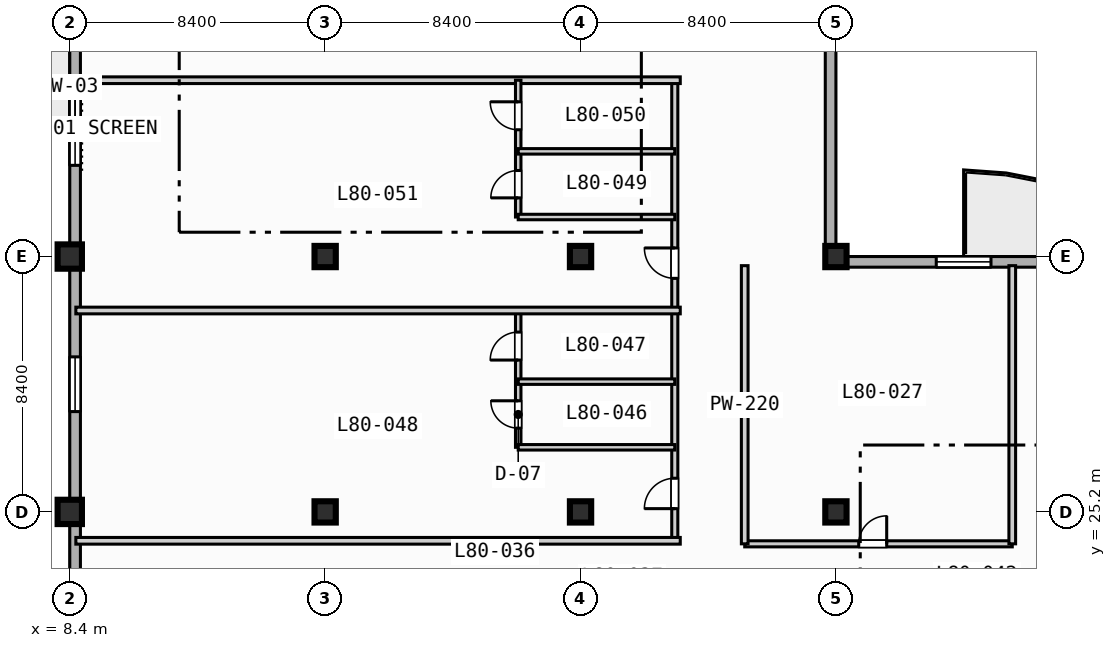
"""IFC4 building model, lengths in metres.
Left out: names, types, materials, properties, quantities, classifications, styles, units other than length and angle.
Written with IfcOpenShell. Run it as: python <this file> out.ifc"""

import sys

from ifc_helpers import new_model, si_unit, direction, frame, frame_2d, origin, origin_2d, place, context, subcontext, project, spatial, rectangle, extrude, element, fill, save


model = new_model("IFC4")
c1 = context("Model", 3, precision=1e-05, world=origin(), true_north=direction((0.0, 1.0)))
c2 = subcontext(c1, "Body", "Model", "MODEL_VIEW")
j1 = project(units=[si_unit("LENGTHUNIT", "METRE"), si_unit("PLANEANGLEUNIT", "RADIAN")], contexts=[c1])
p1 = place(None, origin())
s1 = spatial("IfcSite", under=j1, at=p1, CompositionType="ELEMENT")
p2 = place(p1, origin())
s2 = spatial("IfcBuilding", under=s1, at=p2, CompositionType="ELEMENT")
p3 = place(p2, frame((0.0, 0.0, 324.2)))
s3 = spatial("IfcBuildingStorey", under=s2, at=p3, CompositionType="ELEMENT", Elevation=324.2)
for number, where, z_axis, x_axis in (
    (1, (8.4, 25.2, 0.0), (0.0, 0.0, 1.0), (1.0, 0.0, 0.0)),
    (2, (8.4, 33.6, 0.0), (0.0, 0.0, 1.0), (1.0, 0.0, 0.0)),
):
    element("IfcColumn", number, at=place(p3, frame(where, z_axis=z_axis, x_axis=x_axis)), inside=s3, PredefinedType="COLUMN", context=c2, shape_type="SweptSolid", body=[
        extrude(rectangle(XDim=0.8, YDim=0.8, at=origin_2d()), origin(), (0.0, 0.0, 1.0), 3.9),
    ])
for number, where, z_axis, x_axis in (
    (3, (16.8, 25.2, 0.0), (0.0, 0.0, 1.0), (1.0, 0.0, 0.0)),
    (4, (16.8, 33.6, 0.0), (0.0, 0.0, 1.0), (1.0, 0.0, 0.0)),
    (5, (25.2, 25.2, 0.0), (0.0, 0.0, 1.0), (1.0, 0.0, 0.0)),
    (6, (25.2, 33.6, 0.0), (0.0, 0.0, 1.0), (1.0, 0.0, 0.0)),
    (7, (33.6, 25.2, 0.0), (0.0, 0.0, 1.0), (1.0, 0.0, 0.0)),
    (8, (33.6, 33.6, 0.0), (0.0, 0.0, 1.0), (1.0, 0.0, 0.0)),
):
    element("IfcColumn", number, at=place(p3, frame(where, z_axis=z_axis, x_axis=x_axis)), inside=s3, PredefinedType="COLUMN", context=c2, shape_type="SweptSolid", body=[
        extrude(rectangle(XDim=0.7, YDim=0.7, at=origin_2d()), origin(), (0.0, 0.0, 1.0), 3.9),
    ])
p4 = place(p3, frame((8.575, 11.575, 0.0), z_axis=(0.0, 0.0, 1.0), x_axis=(0.0, 1.0, 0.0)))
e9 = element("IfcWall", 9, at=p4, inside=s3, PredefinedType="STANDARD", context=c2, shape_type="SweptSolid", body=[
    extrude(rectangle(XDim=60.85, YDim=0.35, at=frame_2d((30.425, 0.0))), origin(), (0.0, 0.0, 1.0), 3.67),
])
p5 = place(p4, frame((33.925, 0.0, 0.0)))
e10 = element("IfcOpeningElement", 10, at=p5, cuts=e9, PredefinedType="OPENING", context=c2, shape_type="SweptSolid", body=[
    extrude(rectangle(XDim=1.4, YDim=2.2, at=frame_2d((0.7, 1.1))), frame((0.0, 0.185, 0.0), z_axis=(0.0, -1.0, 0.0), x_axis=(1.0, 0.0, 0.0)), (0.0, 0.0, 1.0), 0.37),
])
p6 = place(p4, frame((16.925, 0.0, 0.85)))
e11 = element("IfcOpeningElement", 11, at=p6, cuts=e9, PredefinedType="OPENING", context=c2, shape_type="SweptSolid", body=[
    extrude(rectangle(XDim=1.8, YDim=1.8, at=frame_2d((0.9, 0.9))), frame((0.0, 0.185, 0.0), z_axis=(0.0, -1.0, 0.0), x_axis=(1.0, 0.0, 0.0)), (0.0, 0.0, 1.0), 0.37),
])
p7 = place(p4, frame((25.025, 0.0, 0.85)))
e12 = element("IfcOpeningElement", 12, at=p7, cuts=e9, PredefinedType="OPENING", context=c2, shape_type="SweptSolid", body=[
    extrude(rectangle(XDim=2.4, YDim=1.95, at=frame_2d((1.2, 0.975))), frame((0.0, 0.185, 0.0), z_axis=(0.0, -1.0, 0.0), x_axis=(1.0, 0.0, 0.0)), (0.0, 0.0, 1.0), 0.37),
])
p8 = place(p4, frame((41.825, 0.0, 0.85)))
e13 = element("IfcOpeningElement", 13, at=p8, cuts=e9, PredefinedType="OPENING", context=c2, shape_type="SweptSolid", body=[
    extrude(rectangle(XDim=2.4, YDim=1.95, at=frame_2d((1.2, 0.975))), frame((0.0, 0.185, 0.0), z_axis=(0.0, -1.0, 0.0), x_axis=(1.0, 0.0, 0.0)), (0.0, 0.0, 1.0), 0.37),
])
p9 = place(p3, frame((33.425, 72.425, 0.0), z_axis=(0.0, 0.0, 1.0), x_axis=(0.0, -1.0, 0.0)))
e14 = element("IfcWall", 14, at=p9, inside=s3, PredefinedType="STANDARD", context=c2, shape_type="SweptSolid", body=[
    extrude(rectangle(XDim=39.0, YDim=0.35, at=frame_2d((19.5, 0.0))), origin(), (0.0, 0.0, 1.0), 3.67),
])
p10 = place(p9, frame((5.9, 0.0, 0.85)))
e15 = element("IfcOpeningElement", 15, at=p10, cuts=e14, PredefinedType="OPENING", context=c2, shape_type="SweptSolid", body=[
    extrude(rectangle(XDim=1.8, YDim=1.8, at=frame_2d((0.9, 0.9))), frame((0.0, 0.185, 0.0), z_axis=(0.0, -1.0, 0.0), x_axis=(1.0, 0.0, 0.0)), (0.0, 0.0, 1.0), 0.37),
])
p11 = place(p3, frame((33.425, 33.425, 0.0), z_axis=(0.0, 0.0, 1.0), x_axis=(1.0, 0.0, 0.0)))
e16 = element("IfcWall", 16, at=p11, inside=s3, PredefinedType="STANDARD", context=c2, shape_type="SweptSolid", body=[
    extrude(rectangle(XDim=30.6, YDim=0.35, at=frame_2d((15.3, 0.0))), origin(), (0.0, 0.0, 1.0), 3.67),
])
p12 = place(p11, frame((12.075, 0.0, 0.0)))
e17 = element("IfcOpeningElement", 17, at=p12, cuts=e16, PredefinedType="OPENING", context=c2, shape_type="SweptSolid", body=[
    extrude(rectangle(XDim=1.4, YDim=2.2, at=frame_2d((0.7, 1.1))), frame((0.0, 0.185, 0.0), z_axis=(0.0, -1.0, 0.0), x_axis=(1.0, 0.0, 0.0)), (0.0, 0.0, 1.0), 0.37),
])
p13 = place(p11, frame((3.475, 0.0, 0.85)))
e18 = element("IfcOpeningElement", 18, at=p13, cuts=e16, PredefinedType="OPENING", context=c2, shape_type="SweptSolid", body=[
    extrude(rectangle(XDim=1.8, YDim=1.8, at=frame_2d((0.9, 0.9))), frame((0.0, 0.185, 0.0), z_axis=(0.0, -1.0, 0.0), x_axis=(1.0, 0.0, 0.0)), (0.0, 0.0, 1.0), 0.37),
])
p14 = place(p3, frame((30.6, 24.15, 0.0), z_axis=(0.0, 0.0, 1.0), x_axis=(1.0, 0.0, 0.0)))
e19 = element("IfcWall", 19, at=p14, inside=s3, PredefinedType="PARTITIONING", context=c2, shape_type="SweptSolid", body=[
    extrude(rectangle(XDim=8.8, YDim=0.2, at=frame_2d((4.4, 0.0))), origin(), (0.0, 0.0, 1.0), 3.67),
])
p15 = place(p14, frame((3.75, 0.0, 0.0)))
e20 = element("IfcOpeningElement", 20, at=p15, cuts=e19, PredefinedType="OPENING", context=c2, shape_type="SweptSolid", body=[
    extrude(rectangle(XDim=0.92, YDim=2.1, at=frame_2d((0.46, 1.05))), frame((0.0, 0.11, 0.0), z_axis=(0.0, -1.0, 0.0), x_axis=(1.0, 0.0, 0.0)), (0.0, 0.0, 1.0), 0.22),
])
for number, where, z_axis, x_axis in (
    (21, (30.6, 24.15, 0.0), (0.0, 0.0, 1.0), (0.0, 1.0, 0.0)),
    (22, (39.4, 24.15, 0.0), (0.0, 0.0, 1.0), (0.0, 1.0, 0.0)),
):
    element("IfcWall", number, at=place(p3, frame(where, z_axis=z_axis, x_axis=x_axis)), inside=s3, PredefinedType="PARTITIONING", context=c2, shape_type="SweptSolid", body=[
        extrude(rectangle(XDim=9.15, YDim=0.22, at=frame_2d((4.575, 0.0))), origin(), (0.0, 0.0, 1.0), 3.67),
    ])
p16 = place(p3, frame((28.3, 24.25, 0.0), z_axis=(0.0, 0.0, 1.0), x_axis=(0.0, 1.0, 0.0)))
e23 = element("IfcWall", 23, at=p16, inside=s3, PredefinedType="PARTITIONING", context=c2, shape_type="SweptSolid", body=[
    extrude(rectangle(XDim=15.15, YDim=0.2, at=frame_2d((7.575, 0.0))), origin(), (0.0, 0.0, 1.0), 3.67),
])
p17 = place(p16, frame((1.058, 0.0, 0.0)))
e24 = element("IfcOpeningElement", 24, at=p17, cuts=e23, PredefinedType="OPENING", context=c2, shape_type="SweptSolid", body=[
    extrude(rectangle(XDim=1.0, YDim=2.15, at=frame_2d((0.5, 1.075))), frame((0.0, 0.11, 0.0), z_axis=(0.0, -1.0, 0.0), x_axis=(1.0, 0.0, 0.0)), (0.0, 0.0, 1.0), 0.22),
])
p18 = place(p16, frame((8.633, 0.0, 0.0)))
e25 = element("IfcOpeningElement", 25, at=p18, cuts=e23, PredefinedType="OPENING", context=c2, shape_type="SweptSolid", body=[
    extrude(rectangle(XDim=1.0, YDim=2.15, at=frame_2d((0.5, 1.075))), frame((0.0, 0.11, 0.0), z_axis=(0.0, -1.0, 0.0), x_axis=(1.0, 0.0, 0.0)), (0.0, 0.0, 1.0), 0.22),
])
p19 = place(p3, frame((8.6, 24.25, 0.0), z_axis=(0.0, 0.0, 1.0), x_axis=(1.0, 0.0, 0.0)))
e26 = element("IfcWall", 26, at=p19, inside=s3, PredefinedType="PARTITIONING", context=c2, shape_type="SweptSolid", body=[
    extrude(rectangle(XDim=19.88, YDim=0.22, at=frame_2d((9.94, 0.0))), origin(), (0.0, 0.0, 1.0), 3.67),
])
p20 = place(p3, frame((23.15, 27.325, 0.0), z_axis=(0.0, 0.0, 1.0), x_axis=(0.0, 1.0, 0.0)))
e27 = element("IfcWall", 27, at=p20, inside=s3, PredefinedType="PLUMBINGWALL", context=c2, shape_type="SweptSolid", body=[
    extrude(rectangle(XDim=4.5, YDim=0.18, at=frame_2d((2.25, 0.0))), origin(), (0.0, 0.0, 1.0), 3.67),
])
p21 = place(p20, frame((0.63, 0.0, 0.0)))
e28 = element("IfcOpeningElement", 28, at=p21, cuts=e27, PredefinedType="OPENING", context=c2, shape_type="SweptSolid", body=[
    extrude(rectangle(XDim=0.9, YDim=2.1, at=frame_2d((0.45, 1.05))), frame((0.0, 0.1, 0.0), z_axis=(0.0, -1.0, 0.0), x_axis=(1.0, 0.0, 0.0)), (0.0, 0.0, 1.0), 0.2),
])
p22 = place(p20, frame((2.87, 0.0, 0.0)))
e29 = element("IfcOpeningElement", 29, at=p22, cuts=e27, PredefinedType="OPENING", context=c2, shape_type="SweptSolid", body=[
    extrude(rectangle(XDim=0.92, YDim=2.1, at=frame_2d((0.46, 1.05))), frame((0.0, 0.1, 0.0), z_axis=(0.0, -1.0, 0.0), x_axis=(1.0, 0.0, 0.0)), (0.0, 0.0, 1.0), 0.2),
])
for number, where, z_axis, x_axis in (
    (30, (23.15, 27.325, 0.0), (0.0, 0.0, 1.0), (1.0, 0.0, 0.0)),
    (31, (23.15, 29.485, 0.0), (0.0, 0.0, 1.0), (1.0, 0.0, 0.0)),
):
    element("IfcWall", number, at=place(p3, frame(where, z_axis=z_axis, x_axis=x_axis)), inside=s3, PredefinedType="PLUMBINGWALL", context=c2, shape_type="SweptSolid", body=[
        extrude(rectangle(XDim=5.15, YDim=0.18, at=frame_2d((2.575, 0.0))), origin(), (0.0, 0.0, 1.0), 3.67),
    ])
for number, where, z_axis, x_axis in (
    (32, (8.6, 31.825, 0.0), (0.0, 0.0, 1.0), (1.0, 0.0, 0.0)),
    (33, (8.6, 39.4, 0.0), (0.0, 0.0, 1.0), (1.0, 0.0, 0.0)),
):
    element("IfcWall", number, at=place(p3, frame(where, z_axis=z_axis, x_axis=x_axis)), inside=s3, PredefinedType="PARTITIONING", context=c2, shape_type="SweptSolid", body=[
        extrude(rectangle(XDim=19.88, YDim=0.22, at=frame_2d((9.94, 0.0))), origin(), (0.0, 0.0, 1.0), 3.67),
    ])
p23 = place(p3, frame((23.15, 34.9, 0.0), z_axis=(0.0, 0.0, 1.0), x_axis=(0.0, 1.0, 0.0)))
e34 = element("IfcWall", 34, at=p23, inside=s3, PredefinedType="PLUMBINGWALL", context=c2, shape_type="SweptSolid", body=[
    extrude(rectangle(XDim=4.5, YDim=0.18, at=frame_2d((2.25, 0.0))), origin(), (0.0, 0.0, 1.0), 3.67),
])
p24 = place(p23, frame((0.63, 0.0, 0.0)))
e35 = element("IfcOpeningElement", 35, at=p24, cuts=e34, PredefinedType="OPENING", context=c2, shape_type="SweptSolid", body=[
    extrude(rectangle(XDim=0.9, YDim=2.1, at=frame_2d((0.45, 1.05))), frame((0.0, 0.1, 0.0), z_axis=(0.0, -1.0, 0.0), x_axis=(1.0, 0.0, 0.0)), (0.0, 0.0, 1.0), 0.2),
])
p25 = place(p23, frame((2.87, 0.0, 0.0)))
e36 = element("IfcOpeningElement", 36, at=p25, cuts=e34, PredefinedType="OPENING", context=c2, shape_type="SweptSolid", body=[
    extrude(rectangle(XDim=0.92, YDim=2.1, at=frame_2d((0.46, 1.05))), frame((0.0, 0.1, 0.0), z_axis=(0.0, -1.0, 0.0), x_axis=(1.0, 0.0, 0.0)), (0.0, 0.0, 1.0), 0.2),
])
for number, where, z_axis, x_axis in (
    (37, (23.15, 34.9, 0.0), (0.0, 0.0, 1.0), (1.0, 0.0, 0.0)),
    (38, (23.15, 37.06, 0.0), (0.0, 0.0, 1.0), (1.0, 0.0, 0.0)),
):
    element("IfcWall", number, at=place(p3, frame(where, z_axis=z_axis, x_axis=x_axis)), inside=s3, PredefinedType="PLUMBINGWALL", context=c2, shape_type="SweptSolid", body=[
        extrude(rectangle(XDim=5.15, YDim=0.18, at=frame_2d((2.575, 0.0))), origin(), (0.0, 0.0, 1.0), 3.67),
    ])
p26 = place(p6, origin())
e39 = element("IfcWindow", 39, at=p26, inside=s3, PartitioningType="SINGLE_PANEL", PredefinedType="WINDOW", context=c2, shape_type="SweptSolid", body=[
    extrude(rectangle(XDim=1.8, YDim=1.8, at=frame_2d((0.9, 0.9))), frame((0.0, 0.03, 0.0), z_axis=(0.0, -1.0, 0.0), x_axis=(1.0, 0.0, 0.0)), (0.0, 0.0, 1.0), 0.06),
])
fill(e11, e39)
p27 = place(p7, origin())
e40 = element("IfcWindow", 40, at=p27, inside=s3, PartitioningType="SINGLE_PANEL", PredefinedType="WINDOW", context=c2, shape_type="SweptSolid", body=[
    extrude(rectangle(XDim=2.4, YDim=1.95, at=frame_2d((1.2, 0.975))), frame((0.0, 0.03, 0.0), z_axis=(0.0, -1.0, 0.0), x_axis=(1.0, 0.0, 0.0)), (0.0, 0.0, 1.0), 0.06),
])
fill(e12, e40)
p28 = place(p13, origin())
e41 = element("IfcWindow", 41, at=p28, inside=s3, PartitioningType="SINGLE_PANEL", PredefinedType="WINDOW", context=c2, shape_type="SweptSolid", body=[
    extrude(rectangle(XDim=1.8, YDim=1.8, at=frame_2d((0.9, 0.9))), frame((0.0, 0.03, 0.0), z_axis=(0.0, -1.0, 0.0), x_axis=(1.0, 0.0, 0.0)), (0.0, 0.0, 1.0), 0.06),
])
fill(e18, e41)
p29 = place(p15, origin())
e42 = element("IfcDoor", 42, at=p29, inside=s3, OperationType="SINGLE_SWING_RIGHT", PredefinedType="DOOR", context=c2, shape_type="SweptSolid", body=[
    extrude(rectangle(XDim=0.92, YDim=2.1, at=frame_2d((0.46, 1.05))), frame((0.0, 0.025, 0.0), z_axis=(0.0, -1.0, 0.0), x_axis=(1.0, 0.0, 0.0)), (0.0, 0.0, 1.0), 0.05),
])
fill(e20, e42)
p30 = place(p17, origin())
e43 = element("IfcDoor", 43, at=p30, inside=s3, OperationType="SINGLE_SWING_LEFT", PredefinedType="DOOR", context=c2, shape_type="SweptSolid", body=[
    extrude(rectangle(XDim=1.0, YDim=2.15, at=frame_2d((0.5, 1.075))), frame((0.0, 0.025, 0.0), z_axis=(0.0, -1.0, 0.0), x_axis=(1.0, 0.0, 0.0)), (0.0, 0.0, 1.0), 0.05),
])
fill(e24, e43)
p31 = place(p18, origin())
e44 = element("IfcDoor", 44, at=p31, inside=s3, OperationType="SINGLE_SWING_RIGHT", PredefinedType="DOOR", context=c2, shape_type="SweptSolid", body=[
    extrude(rectangle(XDim=1.0, YDim=2.15, at=frame_2d((0.5, 1.075))), frame((0.0, 0.025, 0.0), z_axis=(0.0, -1.0, 0.0), x_axis=(1.0, 0.0, 0.0)), (0.0, 0.0, 1.0), 0.05),
])
fill(e25, e44)
p32 = place(p21, origin())
e45 = element("IfcDoor", 45, at=p32, inside=s3, OperationType="SINGLE_SWING_RIGHT", PredefinedType="DOOR", context=c2, shape_type="SweptSolid", body=[
    extrude(rectangle(XDim=0.9, YDim=2.1, at=frame_2d((0.45, 1.05))), frame((0.0, 0.025, 0.0), z_axis=(0.0, -1.0, 0.0), x_axis=(1.0, 0.0, 0.0)), (0.0, 0.0, 1.0), 0.05),
])
fill(e28, e45)
p33 = place(p22, origin())
e46 = element("IfcDoor", 46, at=p33, inside=s3, OperationType="SINGLE_SWING_LEFT", PredefinedType="DOOR", context=c2, shape_type="SweptSolid", body=[
    extrude(rectangle(XDim=0.92, YDim=2.1, at=frame_2d((0.46, 1.05))), frame((0.0, 0.025, 0.0), z_axis=(0.0, -1.0, 0.0), x_axis=(1.0, 0.0, 0.0)), (0.0, 0.0, 1.0), 0.05),
])
fill(e29, e46)
p34 = place(p24, origin())
e47 = element("IfcDoor", 47, at=p34, inside=s3, OperationType="SINGLE_SWING_LEFT", PredefinedType="DOOR", context=c2, shape_type="SweptSolid", body=[
    extrude(rectangle(XDim=0.9, YDim=2.1, at=frame_2d((0.45, 1.05))), frame((0.0, 0.025, 0.0), z_axis=(0.0, -1.0, 0.0), x_axis=(1.0, 0.0, 0.0)), (0.0, 0.0, 1.0), 0.05),
])
fill(e35, e47)
p35 = place(p25, origin())
e48 = element("IfcDoor", 48, at=p35, inside=s3, OperationType="SINGLE_SWING_RIGHT", PredefinedType="DOOR", context=c2, shape_type="SweptSolid", body=[
    extrude(rectangle(XDim=0.92, YDim=2.1, at=frame_2d((0.46, 1.05))), frame((0.0, 0.025, 0.0), z_axis=(0.0, -1.0, 0.0), x_axis=(1.0, 0.0, 0.0)), (0.0, 0.0, 1.0), 0.05),
])
fill(e36, e48)
save(model, sys.argv[1])
